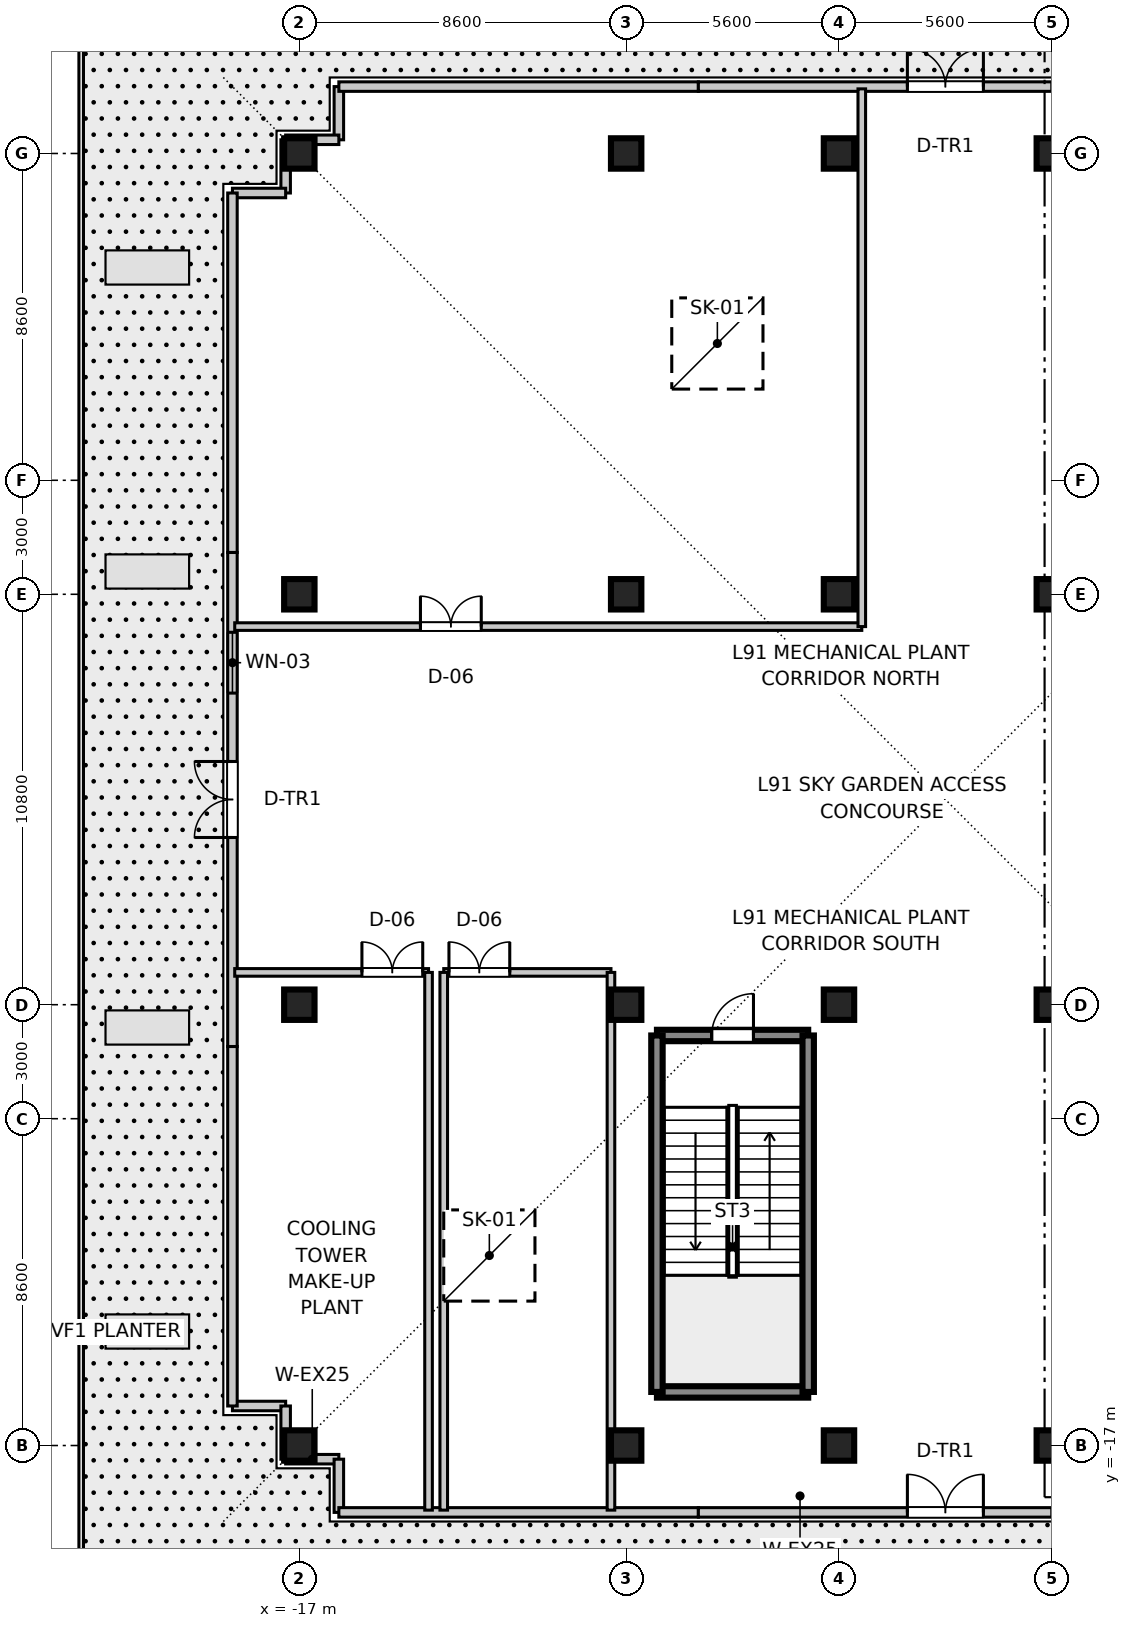
"""IFC4 building model, lengths in metres.
Left out: names, types, materials, properties, quantities, classifications, styles, units other than length and angle.
Written with IfcOpenShell. Run it as: python <this file> out.ifc"""

import sys

from ifc_helpers import new_model, si_unit, direction, frame, frame_2d, origin, origin_2d, place, context, subcontext, project, spatial, rectangle, extrude, source, transform, mapped, element, fill, save


model = new_model("IFC4")
c1 = context("Model", 3, precision=1e-05, world=origin(), true_north=direction((0.0, 1.0)))
c2 = subcontext(c1, "Body", "Model", "MODEL_VIEW")
j1 = project(units=[si_unit("LENGTHUNIT", "METRE"), si_unit("PLANEANGLEUNIT", "RADIAN")], contexts=[c1])
p1 = place(None, origin())
s1 = spatial("IfcSite", under=j1, at=p1, CompositionType="ELEMENT")
p2 = place(p1, origin())
s2 = spatial("IfcBuilding", under=s1, at=p2, CompositionType="ELEMENT")
p3 = place(p2, frame((0.0, 0.0, 357.05)))
s3 = spatial("IfcBuildingStorey", under=s2, at=p3, CompositionType="ELEMENT", Elevation=357.05)
m1 = source(origin(), c2, "Body", "SweptSolid", [
    extrude(rectangle(XDim=0.8, YDim=0.8, at=origin_2d()), origin(), (0.0, 0.0, 1.0), 4.555),
])
for number, where, z_axis, x_axis in (
    (1, (-17.0, -17.0, 0.0), (0.0, 0.0, 1.0), (1.0, 0.0, 0.0)),
    (2, (-17.0, -5.4, 0.0), (0.0, 0.0, 1.0), (1.0, 0.0, 0.0)),
    (3, (-17.0, 5.4, 0.0), (0.0, 0.0, 1.0), (1.0, 0.0, 0.0)),
    (4, (-17.0, 17.0, 0.0), (0.0, 0.0, 1.0), (1.0, 0.0, 0.0)),
    (5, (-8.4, -17.0, 0.0), (0.0, 0.0, 1.0), (1.0, 0.0, 0.0)),
    (6, (-8.4, -5.4, 0.0), (0.0, 0.0, 1.0), (1.0, 0.0, 0.0)),
    (7, (-8.4, 5.4, 0.0), (0.0, 0.0, 1.0), (1.0, 0.0, 0.0)),
    (8, (-8.4, 17.0, 0.0), (0.0, 0.0, 1.0), (1.0, 0.0, 0.0)),
    (9, (-2.8, -17.0, 0.0), (0.0, 0.0, 1.0), (1.0, 0.0, 0.0)),
    (10, (-2.8, -5.4, 0.0), (0.0, 0.0, 1.0), (1.0, 0.0, 0.0)),
    (11, (-2.8, 5.4, 0.0), (0.0, 0.0, 1.0), (1.0, 0.0, 0.0)),
    (12, (-2.8, 17.0, 0.0), (0.0, 0.0, 1.0), (1.0, 0.0, 0.0)),
    (13, (2.8, -17.0, 0.0), (0.0, 0.0, 1.0), (1.0, 0.0, 0.0)),
    (14, (2.8, -5.4, 0.0), (0.0, 0.0, 1.0), (1.0, 0.0, 0.0)),
    (15, (2.8, 5.4, 0.0), (0.0, 0.0, 1.0), (1.0, 0.0, 0.0)),
    (16, (2.8, 17.0, 0.0), (0.0, 0.0, 1.0), (1.0, 0.0, 0.0)),
):
    element("IfcColumn", number, at=place(p3, frame(where, z_axis=z_axis, x_axis=x_axis)), inside=s3, PredefinedType="COLUMN", context=c2, shape_type="MappedRepresentation", body=[
        mapped(m1, transform((0.0, 0.0, 0.0), scale=1.0)),
    ])
m2 = source(origin(), c2, "Body", "SweptSolid", [
    extrude(rectangle(XDim=3.98, YDim=0.3, at=frame_2d((1.99, 0.0))), origin(), (0.0, 0.0, 1.0), 4.3),
])
p4 = place(p3, frame((-7.59, -15.59, 0.0), z_axis=(0.0, 0.0, 1.0), x_axis=(1.0, 0.0, 0.0)))
e17 = element("IfcWall", 17, at=p4, inside=s3, PredefinedType="SHEAR", context=c2, shape_type="MappedRepresentation", body=[
    mapped(m2, transform((0.0, 0.0, 0.0), scale=1.0)),
])
p5 = place(p3, frame((-7.59, -6.21, 0.0), z_axis=(0.0, 0.0, 1.0), x_axis=(1.0, 0.0, 0.0)))
e18 = element("IfcWall", 18, at=p5, inside=s3, PredefinedType="SHEAR", context=c2, shape_type="MappedRepresentation", body=[
    mapped(m2, transform((0.0, 0.0, 0.0), scale=1.0)),
])
p6 = place(p5, frame((1.44, 0.0, 0.0)))
e19 = element("IfcOpeningElement", 19, at=p6, cuts=e18, PredefinedType="OPENING", context=c2, shape_type="SweptSolid", body=[
    extrude(rectangle(XDim=1.1, YDim=2.15, at=frame_2d((0.55, 1.075))), frame((0.0, 0.16, 0.0), z_axis=(0.0, -1.0, 0.0), x_axis=(1.0, 0.0, 0.0)), (0.0, 0.0, 1.0), 0.32),
])
m3 = source(origin(), c2, "Body", "SweptSolid", [
    extrude(rectangle(XDim=9.38, YDim=0.3, at=frame_2d((4.69, 0.0))), origin(), (0.0, 0.0, 1.0), 4.3),
])
for number, where, z_axis, x_axis in (
    (20, (-7.59, -15.59, 0.0), (0.0, 0.0, 1.0), (0.0, 1.0, 0.0)),
    (21, (-3.61, -15.59, 0.0), (0.0, 0.0, 1.0), (0.0, 1.0, 0.0)),
):
    element("IfcWall", number, at=place(p3, frame(where, z_axis=z_axis, x_axis=x_axis)), inside=s3, PredefinedType="SHEAR", context=c2, shape_type="MappedRepresentation", body=[
        mapped(m3, transform((0.0, 0.0, 0.0), scale=1.0)),
    ])
m4 = source(origin(), c2, "Body", "SweptSolid", [
    extrude(rectangle(XDim=1.4, YDim=0.25, at=frame_2d((0.7, 0.0))), origin(), (0.0, 0.0, 1.0), 4.3),
])
p7 = place(p3, frame((-15.96, 17.36, 0.0), z_axis=(0.0, 0.0, 1.0), x_axis=(0.0, 1.0, 0.0)))
e22 = element("IfcWall", 22, at=p7, inside=s3, PredefinedType="STANDARD", context=c2, shape_type="MappedRepresentation", body=[
    mapped(m4, transform((0.0, 0.0, 0.0), scale=1.0)),
])
m5 = source(origin(), c2, "Body", "SweptSolid", [
    extrude(rectangle(XDim=1.4, YDim=0.25, at=frame_2d((0.7, 0.0))), origin(), (0.0, 0.0, 1.0), 4.3),
])
for number, where, z_axis, x_axis in (
    (23, (-17.36, 17.36, 0.0), (0.0, 0.0, 1.0), (1.0, 0.0, 0.0)),
    (24, (-17.36, 15.96, 0.0), (0.0, 0.0, 1.0), (0.0, 1.0, 0.0)),
):
    element("IfcWall", number, at=place(p3, frame(where, z_axis=z_axis, x_axis=x_axis)), inside=s3, PredefinedType="STANDARD", context=c2, shape_type="MappedRepresentation", body=[
        mapped(m5, transform((0.0, 0.0, 0.0), scale=1.0)),
    ])
for number, where, z_axis, x_axis in (
    (25, (-18.76, 15.96, 0.0), (0.0, 0.0, 1.0), (1.0, 0.0, 0.0)),
    (26, (-18.76, -15.96, 0.0), (0.0, 0.0, 1.0), (1.0, 0.0, 0.0)),
):
    element("IfcWall", number, at=place(p3, frame(where, z_axis=z_axis, x_axis=x_axis)), inside=s3, PredefinedType="STANDARD", context=c2, shape_type="MappedRepresentation", body=[
        mapped(m4, transform((0.0, 0.0, 0.0), scale=1.0)),
    ])
for number, where, z_axis, x_axis in (
    (27, (-17.36, -17.36, 0.0), (0.0, 0.0, 1.0), (0.0, 1.0, 0.0)),
    (28, (-17.36, -17.36, 0.0), (0.0, 0.0, 1.0), (1.0, 0.0, 0.0)),
):
    element("IfcWall", number, at=place(p3, frame(where, z_axis=z_axis, x_axis=x_axis)), inside=s3, PredefinedType="STANDARD", context=c2, shape_type="MappedRepresentation", body=[
        mapped(m5, transform((0.0, 0.0, 0.0), scale=1.0)),
    ])
p8 = place(p3, frame((-15.96, -18.76, 0.0), z_axis=(0.0, 0.0, 1.0), x_axis=(0.0, 1.0, 0.0)))
e29 = element("IfcWall", 29, at=p8, inside=s3, PredefinedType="STANDARD", context=c2, shape_type="MappedRepresentation", body=[
    mapped(m4, transform((0.0, 0.0, 0.0), scale=1.0)),
])
m6 = source(origin(), c2, "Body", "SweptSolid", [
    extrude(rectangle(XDim=9.46, YDim=0.25, at=frame_2d((4.73, 0.0))), origin(), (0.0, 0.0, 1.0), 3.78),
])
p9 = place(p3, frame((-15.96, -18.76, 0.0), z_axis=(0.0, 0.0, 1.0), x_axis=(1.0, 0.0, 0.0)))
e30 = element("IfcWall", 30, at=p9, inside=s3, PredefinedType="STANDARD", context=c2, shape_type="MappedRepresentation", body=[
    mapped(m6, transform((0.0, 0.0, 0.0), scale=1.0)),
])
m7 = source(origin(), c2, "Body", "SweptSolid", [
    extrude(rectangle(XDim=13.0, YDim=0.25, at=frame_2d((6.5, 0.0))), origin(), (0.0, 0.0, 1.0), 3.78),
])
p10 = place(p3, frame((-6.5, -18.76, 0.0), z_axis=(0.0, 0.0, 1.0), x_axis=(1.0, 0.0, 0.0)))
e31 = element("IfcWall", 31, at=p10, inside=s3, PredefinedType="STANDARD", context=c2, shape_type="MappedRepresentation", body=[
    mapped(m7, transform((0.0, 0.0, 0.0), scale=1.0)),
])
p11 = place(p10, frame((5.5, 0.0, 0.0)))
e32 = element("IfcOpeningElement", 32, at=p11, cuts=e31, PredefinedType="OPENING", context=c2, shape_type="SweptSolid", body=[
    extrude(rectangle(XDim=2.0, YDim=2.35, at=frame_2d((1.0, 1.175))), frame((0.0, 0.135, 0.0), z_axis=(0.0, -1.0, 0.0), x_axis=(1.0, 0.0, 0.0)), (0.0, 0.0, 1.0), 0.27),
])
p12 = place(p10, frame((9.3, 0.0, 0.9)))
e33 = element("IfcOpeningElement", 33, at=p12, cuts=e31, PredefinedType="OPENING", context=c2, shape_type="SweptSolid", body=[
    extrude(rectangle(XDim=1.6, YDim=1.8, at=frame_2d((0.8, 0.9))), frame((0.0, 0.135, 0.0), z_axis=(0.0, -1.0, 0.0), x_axis=(1.0, 0.0, 0.0)), (0.0, 0.0, 1.0), 0.27),
])
p13 = place(p3, frame((-15.96, 18.76, 0.0), z_axis=(0.0, 0.0, 1.0), x_axis=(1.0, 0.0, 0.0)))
e34 = element("IfcWall", 34, at=p13, inside=s3, PredefinedType="STANDARD", context=c2, shape_type="MappedRepresentation", body=[
    mapped(m6, transform((0.0, 0.0, 0.0), scale=1.0)),
])
p14 = place(p3, frame((-6.5, 18.76, 0.0), z_axis=(0.0, 0.0, 1.0), x_axis=(1.0, 0.0, 0.0)))
e35 = element("IfcWall", 35, at=p14, inside=s3, PredefinedType="STANDARD", context=c2, shape_type="MappedRepresentation", body=[
    mapped(m7, transform((0.0, 0.0, 0.0), scale=1.0)),
])
p15 = place(p14, frame((5.5, 0.0, 0.0)))
e36 = element("IfcOpeningElement", 36, at=p15, cuts=e35, PredefinedType="OPENING", context=c2, shape_type="SweptSolid", body=[
    extrude(rectangle(XDim=2.0, YDim=2.35, at=frame_2d((1.0, 1.175))), frame((0.0, 0.135, 0.0), z_axis=(0.0, -1.0, 0.0), x_axis=(1.0, 0.0, 0.0)), (0.0, 0.0, 1.0), 0.27),
])
p16 = place(p14, frame((9.3, 0.0, 0.9)))
e37 = element("IfcOpeningElement", 37, at=p16, cuts=e35, PredefinedType="OPENING", context=c2, shape_type="SweptSolid", body=[
    extrude(rectangle(XDim=1.6, YDim=1.8, at=frame_2d((0.8, 0.9))), frame((0.0, 0.135, 0.0), z_axis=(0.0, -1.0, 0.0), x_axis=(1.0, 0.0, 0.0)), (0.0, 0.0, 1.0), 0.27),
])
for number, where, z_axis, x_axis in (
    (38, (-18.76, -15.96, 0.0), (0.0, 0.0, 1.0), (0.0, 1.0, 0.0)),
    (39, (-18.76, 6.5, 0.0), (0.0, 0.0, 1.0), (0.0, 1.0, 0.0)),
):
    element("IfcWall", number, at=place(p3, frame(where, z_axis=z_axis, x_axis=x_axis)), inside=s3, PredefinedType="STANDARD", context=c2, shape_type="MappedRepresentation", body=[
        mapped(m6, transform((0.0, 0.0, 0.0), scale=1.0)),
    ])
p17 = place(p3, frame((-18.76, -6.5, 0.0), z_axis=(0.0, 0.0, 1.0), x_axis=(0.0, 1.0, 0.0)))
e40 = element("IfcWall", 40, at=p17, inside=s3, PredefinedType="STANDARD", context=c2, shape_type="MappedRepresentation", body=[
    mapped(m7, transform((0.0, 0.0, 0.0), scale=1.0)),
])
p18 = place(p17, frame((5.5, 0.0, 0.0)))
e41 = element("IfcOpeningElement", 41, at=p18, cuts=e40, PredefinedType="OPENING", context=c2, shape_type="SweptSolid", body=[
    extrude(rectangle(XDim=2.0, YDim=2.35, at=frame_2d((1.0, 1.175))), frame((0.0, 0.135, 0.0), z_axis=(0.0, -1.0, 0.0), x_axis=(1.0, 0.0, 0.0)), (0.0, 0.0, 1.0), 0.27),
])
p19 = place(p17, frame((9.3, 0.0, 0.9)))
e42 = element("IfcOpeningElement", 42, at=p19, cuts=e40, PredefinedType="OPENING", context=c2, shape_type="SweptSolid", body=[
    extrude(rectangle(XDim=1.6, YDim=1.8, at=frame_2d((0.8, 0.9))), frame((0.0, 0.135, 0.0), z_axis=(0.0, -1.0, 0.0), x_axis=(1.0, 0.0, 0.0)), (0.0, 0.0, 1.0), 0.27),
])
m8 = source(origin(), c2, "Body", "SweptSolid", [
    extrude(rectangle(XDim=16.5, YDim=0.2, at=frame_2d((8.25, 0.0))), origin(), (0.0, 0.0, 1.0), 3.4),
])
p20 = place(p3, frame((-18.7, 4.55, 0.0), z_axis=(0.0, 0.0, 1.0), x_axis=(1.0, 0.0, 0.0)))
e43 = element("IfcWall", 43, at=p20, inside=s3, PredefinedType="PARTITIONING", context=c2, shape_type="MappedRepresentation", body=[
    mapped(m8, transform((0.0, 0.0, 0.0), scale=1.0)),
])
p21 = place(p20, frame((4.887, 0.0, 0.0)))
e44 = element("IfcOpeningElement", 44, at=p21, cuts=e43, PredefinedType="OPENING", context=c2, shape_type="SweptSolid", body=[
    extrude(rectangle(XDim=1.6, YDim=2.15, at=frame_2d((0.8, 1.075))), frame((0.0, 0.11, 0.0), z_axis=(0.0, -1.0, 0.0), x_axis=(1.0, 0.0, 0.0)), (0.0, 0.0, 1.0), 0.22),
])
m9 = source(origin(), c2, "Body", "SweptSolid", [
    extrude(rectangle(XDim=14.15, YDim=0.2, at=frame_2d((7.075, 0.0))), origin(), (0.0, 0.0, 1.0), 3.4),
])
p22 = place(p3, frame((-2.2, 4.55, 0.0), z_axis=(0.0, 0.0, 1.0), x_axis=(0.0, 1.0, 0.0)))
e45 = element("IfcWall", 45, at=p22, inside=s3, PredefinedType="PARTITIONING", context=c2, shape_type="MappedRepresentation", body=[
    mapped(m9, transform((0.0, 0.0, 0.0), scale=1.0)),
])
m10 = source(origin(), c2, "Body", "SweptSolid", [
    extrude(rectangle(XDim=5.1, YDim=0.2, at=frame_2d((2.55, 0.0))), origin(), (0.0, 0.0, 1.0), 3.4),
])
p23 = place(p3, frame((-18.7, -4.55, 0.0), z_axis=(0.0, 0.0, 1.0), x_axis=(1.0, 0.0, 0.0)))
e46 = element("IfcWall", 46, at=p23, inside=s3, PredefinedType="PARTITIONING", context=c2, shape_type="MappedRepresentation", body=[
    mapped(m10, transform((0.0, 0.0, 0.0), scale=1.0)),
])
p24 = place(p23, frame((3.347, 0.0, 0.0)))
e47 = element("IfcOpeningElement", 47, at=p24, cuts=e46, PredefinedType="OPENING", context=c2, shape_type="SweptSolid", body=[
    extrude(rectangle(XDim=1.6, YDim=2.15, at=frame_2d((0.8, 1.075))), frame((0.0, 0.11, 0.0), z_axis=(0.0, -1.0, 0.0), x_axis=(1.0, 0.0, 0.0)), (0.0, 0.0, 1.0), 0.22),
])
p25 = place(p3, frame((-13.6, -18.7, 0.0), z_axis=(0.0, 0.0, 1.0), x_axis=(0.0, 1.0, 0.0)))
e48 = element("IfcWall", 48, at=p25, inside=s3, PredefinedType="PARTITIONING", context=c2, shape_type="MappedRepresentation", body=[
    mapped(m9, transform((0.0, 0.0, 0.0), scale=1.0)),
])
m11 = source(origin(), c2, "Body", "SweptSolid", [
    extrude(rectangle(XDim=4.4, YDim=0.2, at=frame_2d((2.2, 0.0))), origin(), (0.0, 0.0, 1.0), 3.4),
])
p26 = place(p3, frame((-13.2, -4.55, 0.0), z_axis=(0.0, 0.0, 1.0), x_axis=(1.0, 0.0, 0.0)))
e49 = element("IfcWall", 49, at=p26, inside=s3, PredefinedType="PARTITIONING", context=c2, shape_type="MappedRepresentation", body=[
    mapped(m11, transform((0.0, 0.0, 0.0), scale=1.0)),
])
p27 = place(p26, frame((0.137, 0.0, 0.0)))
e50 = element("IfcOpeningElement", 50, at=p27, cuts=e49, PredefinedType="OPENING", context=c2, shape_type="SweptSolid", body=[
    extrude(rectangle(XDim=1.6, YDim=2.15, at=frame_2d((0.8, 1.075))), frame((0.0, 0.11, 0.0), z_axis=(0.0, -1.0, 0.0), x_axis=(1.0, 0.0, 0.0)), (0.0, 0.0, 1.0), 0.22),
])
for number, where, z_axis, x_axis in (
    (51, (-13.2, -18.7, 0.0), (0.0, 0.0, 1.0), (0.0, 1.0, 0.0)),
    (52, (-8.8, -18.7, 0.0), (0.0, 0.0, 1.0), (0.0, 1.0, 0.0)),
):
    element("IfcWall", number, at=place(p3, frame(where, z_axis=z_axis, x_axis=x_axis)), inside=s3, PredefinedType="PARTITIONING", context=c2, shape_type="MappedRepresentation", body=[
        mapped(m9, transform((0.0, 0.0, 0.0), scale=1.0)),
    ])
m12 = source(origin(), c2, "Body", "SweptSolid", [
    extrude(rectangle(XDim=1.1, YDim=2.15, at=frame_2d((0.55, 1.075))), frame((0.0, 0.025, 0.0), z_axis=(0.0, -1.0, 0.0), x_axis=(1.0, 0.0, 0.0)), (0.0, 0.0, 1.0), 0.05),
])
p28 = place(p6, frame((1.1, 0.0, 0.0), z_axis=(0.0, 0.0, 1.0), x_axis=(-1.0, 0.0, 0.0)))
e53 = element("IfcDoor", 53, at=p28, inside=s3, OperationType="SINGLE_SWING_RIGHT", PredefinedType="DOOR", context=c2, shape_type="MappedRepresentation", body=[
    mapped(m12, transform((0.0, 0.0, 0.0), scale=1.0)),
])
fill(e19, e53)
p29 = place(p3, frame((0.0, 0.0, -0.3)))
p30 = place(p29, frame((-6.0, 12.0, 0.0)))
p31 = place(p30, frame((0.0, 0.0, 0.25)))
e54 = element("IfcWindow", 54, at=p31, inside=s3, PartitioningType="SINGLE_PANEL", PredefinedType="SKYLIGHT", context=c2, shape_type="SweptSolid", body=[
    extrude(rectangle(XDim=2.4, YDim=2.4, at=origin_2d()), origin(), (0.0, 0.0, 1.0), 0.05),
])
p32 = place(p29, frame((-12.0, -12.0, 0.0)))
p33 = place(p32, frame((0.0, 0.0, 0.25)))
e55 = element("IfcWindow", 55, at=p33, inside=s3, PartitioningType="SINGLE_PANEL", PredefinedType="SKYLIGHT", context=c2, shape_type="SweptSolid", body=[
    extrude(rectangle(XDim=2.4, YDim=2.4, at=origin_2d()), origin(), (0.0, 0.0, 1.0), 0.05),
])
m13 = source(origin(), c2, "Body", "SweptSolid", [
    extrude(rectangle(XDim=2.0, YDim=2.35, at=frame_2d((1.0, 1.175))), frame((0.0, 0.025, 0.0), z_axis=(0.0, -1.0, 0.0), x_axis=(1.0, 0.0, 0.0)), (0.0, 0.0, 1.0), 0.05),
])
p34 = place(p11, frame((2.0, 0.0, 0.0), z_axis=(0.0, 0.0, 1.0), x_axis=(-1.0, 0.0, 0.0)))
e56 = element("IfcDoor", 56, at=p34, inside=s3, OperationType="DOUBLE_DOOR_SINGLE_SWING", PredefinedType="DOOR", context=c2, shape_type="MappedRepresentation", body=[
    mapped(m13, transform((0.0, 0.0, 0.0), scale=1.0)),
])
fill(e32, e56)
p35 = place(p15, origin())
e57 = element("IfcDoor", 57, at=p35, inside=s3, OperationType="DOUBLE_DOOR_SINGLE_SWING", PredefinedType="DOOR", context=c2, shape_type="MappedRepresentation", body=[
    mapped(m13, transform((0.0, 0.0, 0.0), scale=1.0)),
])
fill(e36, e57)
p36 = place(p18, origin())
e58 = element("IfcDoor", 58, at=p36, inside=s3, OperationType="DOUBLE_DOOR_SINGLE_SWING", PredefinedType="DOOR", context=c2, shape_type="MappedRepresentation", body=[
    mapped(m13, transform((0.0, 0.0, 0.0), scale=1.0)),
])
fill(e41, e58)
m14 = source(origin(), c2, "Body", "SweptSolid", [
    extrude(rectangle(XDim=1.6, YDim=1.8, at=frame_2d((0.8, 0.9))), frame((0.0, 0.03, 0.0), z_axis=(0.0, -1.0, 0.0), x_axis=(1.0, 0.0, 0.0)), (0.0, 0.0, 1.0), 0.06),
])
p37 = place(p19, origin())
e59 = element("IfcWindow", 59, at=p37, inside=s3, PartitioningType="SINGLE_PANEL", PredefinedType="WINDOW", context=c2, shape_type="MappedRepresentation", body=[
    mapped(m14, transform((0.0, 0.0, 0.0), scale=1.0)),
])
fill(e42, e59)
m15 = source(origin(), c2, "Body", "SweptSolid", [
    extrude(rectangle(XDim=1.6, YDim=2.15, at=frame_2d((0.8, 1.075))), frame((0.0, 0.025, 0.0), z_axis=(0.0, -1.0, 0.0), x_axis=(1.0, 0.0, 0.0)), (0.0, 0.0, 1.0), 0.05),
])
p38 = place(p21, origin())
e60 = element("IfcDoor", 60, at=p38, inside=s3, OperationType="DOUBLE_DOOR_SINGLE_SWING", PredefinedType="DOOR", context=c2, shape_type="MappedRepresentation", body=[
    mapped(m15, transform((0.0, 0.0, 0.0), scale=1.0)),
])
fill(e44, e60)
p39 = place(p24, frame((1.6, 0.0, 0.0), z_axis=(0.0, 0.0, 1.0), x_axis=(-1.0, 0.0, 0.0)))
e61 = element("IfcDoor", 61, at=p39, inside=s3, OperationType="DOUBLE_DOOR_SINGLE_SWING", PredefinedType="DOOR", context=c2, shape_type="MappedRepresentation", body=[
    mapped(m15, transform((0.0, 0.0, 0.0), scale=1.0)),
])
fill(e47, e61)
p40 = place(p27, frame((1.6, 0.0, 0.0), z_axis=(0.0, 0.0, 1.0), x_axis=(-1.0, 0.0, 0.0)))
e62 = element("IfcDoor", 62, at=p40, inside=s3, OperationType="DOUBLE_DOOR_SINGLE_SWING", PredefinedType="DOOR", context=c2, shape_type="MappedRepresentation", body=[
    mapped(m15, transform((0.0, 0.0, 0.0), scale=1.0)),
])
fill(e50, e62)
save(model, sys.argv[1])
